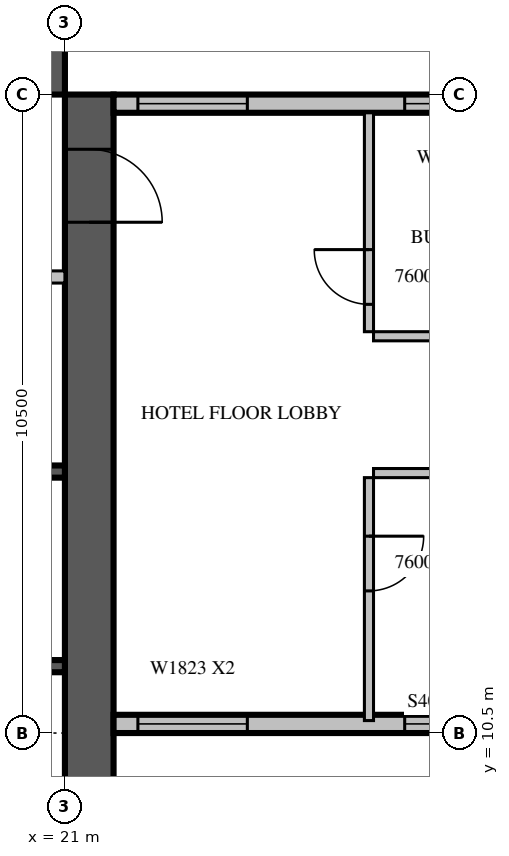
"""IFC4 building model, lengths in metres.
Left out: names, types, materials, properties, quantities, classifications, styles, units other than length and angle.
Written with IfcOpenShell. Run it as: python <this file> out.ifc"""

import sys

from ifc_helpers import new_model, si_unit, direction, frame, frame_2d, origin, place, context, subcontext, project, spatial, rectangle, extrude, source, transform, mapped, element, fill, save


model = new_model("IFC4")
c1 = context("Model", 3, precision=1e-05, world=origin(), true_north=direction((0.0, 1.0)))
c2 = subcontext(c1, "Body", "Model", "MODEL_VIEW")
j1 = project(units=[si_unit("LENGTHUNIT", "METRE"), si_unit("PLANEANGLEUNIT", "RADIAN")], contexts=[c1])
p1 = place(None, origin())
s1 = spatial("IfcSite", under=j1, at=p1, CompositionType="ELEMENT")
p2 = place(p1, origin())
s2 = spatial("IfcBuilding", under=s1, at=p2, CompositionType="ELEMENT")
p3 = place(p2, frame((0.0, 0.0, 261.4)))
s3 = spatial("IfcBuildingStorey", under=s2, at=p3, CompositionType="ELEMENT", Elevation=261.4)
m1 = source(origin(), c2, "Body", "SweptSolid", [
    extrude(rectangle(XDim=16.8, YDim=0.8, at=frame_2d((8.4, 0.0))), origin(), (0.0, 0.0, 1.0), 3.8),
])
p4 = place(p3, frame((21.4, 4.2, 0.0), z_axis=(0.0, 0.0, 1.0), x_axis=(0.0, 1.0, 0.0)))
e1 = element("IfcWall", 1, at=p4, inside=s3, PredefinedType="SHEAR", context=c2, shape_type="MappedRepresentation", body=[
    mapped(m1, transform((0.0, 0.0, 0.0), scale=1.0)),
])
m2 = source(origin(), c2, "Body", "SweptSolid", [
    extrude(rectangle(XDim=1.2, YDim=2.1, at=frame_2d((0.6, 1.05))), frame((0.0, 0.41, 0.0), z_axis=(0.0, -1.0, 0.0), x_axis=(1.0, 0.0, 0.0)), (0.0, 0.0, 1.0), 0.82),
])
p5 = place(p4, frame((14.7, 0.0, 0.0)))
e2 = element("IfcOpeningElement", 2, at=p5, cuts=e1, PredefinedType="OPENING", context=c2, shape_type="MappedRepresentation", body=[
    mapped(m2, transform((0.0, 0.0, 0.0), scale=1.0)),
])
p6 = place(p3, frame((4.2, 21.4, 0.0), z_axis=(0.0, 0.0, 1.0), x_axis=(1.0, 0.0, 0.0)))
e3 = element("IfcWall", 3, at=p6, inside=s3, PredefinedType="SHEAR", context=c2, shape_type="MappedRepresentation", body=[
    mapped(m1, transform((0.0, 0.0, 0.0), scale=1.0)),
])
p7 = place(p6, frame((6.2, 0.0, 0.0)))
e4 = element("IfcOpeningElement", 4, at=p7, cuts=e3, PredefinedType="OPENING", context=c2, shape_type="MappedRepresentation", body=[
    mapped(m2, transform((0.0, 0.0, 0.0), scale=1.0)),
])
m3 = source(origin(), c2, "Body", "SweptSolid", [
    extrude(rectangle(XDim=7.2, YDim=0.3, at=frame_2d((3.6, 0.0))), origin(), (0.0, 0.0, 1.0), 3.4),
])
p8 = place(p3, frame((21.8, 10.65, 0.0), z_axis=(0.0, 0.0, 1.0), x_axis=(1.0, 0.0, 0.0)))
e5 = element("IfcWall", 5, at=p8, inside=s3, PredefinedType="STANDARD", context=c2, shape_type="MappedRepresentation", body=[
    mapped(m3, transform((0.0, 0.0, 0.0), scale=1.0)),
])
m4 = source(origin(), c2, "Body", "SweptSolid", [
    extrude(rectangle(XDim=1.8, YDim=2.3, at=frame_2d((0.9, 1.15))), frame((0.0, 0.16, 0.0), z_axis=(0.0, -1.0, 0.0), x_axis=(1.0, 0.0, 0.0)), (0.0, 0.0, 1.0), 0.32),
])
p9 = place(p8, frame((0.4, 0.0, 0.6)))
e6 = element("IfcOpeningElement", 6, at=p9, cuts=e5, PredefinedType="OPENING", context=c2, shape_type="MappedRepresentation", body=[
    mapped(m4, transform((0.0, 0.0, 0.0), scale=1.0)),
])
p10 = place(p8, frame((4.787, 0.0, 0.6)))
e7 = element("IfcOpeningElement", 7, at=p10, cuts=e5, PredefinedType="OPENING", context=c2, shape_type="MappedRepresentation", body=[
    mapped(m4, transform((0.0, 0.0, 0.0), scale=1.0)),
])
p11 = place(p3, frame((29.0, 20.85, 0.0), z_axis=(0.0, 0.0, 1.0), x_axis=(-1.0, 0.0, 0.0)))
e8 = element("IfcWall", 8, at=p11, inside=s3, PredefinedType="STANDARD", context=c2, shape_type="MappedRepresentation", body=[
    mapped(m3, transform((0.0, 0.0, 0.0), scale=1.0)),
])
p12 = place(p11, frame((0.613, 0.0, 0.6)))
e9 = element("IfcOpeningElement", 9, at=p12, cuts=e8, PredefinedType="OPENING", context=c2, shape_type="MappedRepresentation", body=[
    mapped(m4, transform((0.0, 0.0, 0.0), scale=1.0)),
])
p13 = place(p11, frame((5.0, 0.0, 0.6)))
e10 = element("IfcOpeningElement", 10, at=p13, cuts=e8, PredefinedType="OPENING", context=c2, shape_type="MappedRepresentation", body=[
    mapped(m4, transform((0.0, 0.0, 0.0), scale=1.0)),
])
m5 = source(origin(), c2, "Body", "SweptSolid", [
    extrude(rectangle(XDim=9.6, YDim=0.2, at=frame_2d((4.8, 0.0))), origin(), (0.0, 0.0, 1.0), 3.8),
])
p14 = place(p3, frame((11.4, 11.6, 0.0), z_axis=(0.0, 0.0, 1.0), x_axis=(1.0, 0.0, 0.0)))
e11 = element("IfcWall", 11, at=p14, inside=s3, PredefinedType="SOLIDWALL", context=c2, shape_type="MappedRepresentation", body=[
    mapped(m5, transform((0.0, 0.0, 0.0), scale=1.0)),
])
p15 = place(p3, frame((11.4, 14.8, 0.0), z_axis=(0.0, 0.0, 1.0), x_axis=(1.0, 0.0, 0.0)))
e12 = element("IfcWall", 12, at=p15, inside=s3, PredefinedType="SOLIDWALL", context=c2, shape_type="MappedRepresentation", body=[
    mapped(m5, transform((0.0, 0.0, 0.0), scale=1.0)),
])
m6 = source(origin(), c2, "Body", "SweptSolid", [
    extrude(rectangle(XDim=1.1, YDim=2.1, at=frame_2d((0.55, 1.05))), frame((0.0, 0.11, 0.0), z_axis=(0.0, -1.0, 0.0), x_axis=(1.0, 0.0, 0.0)), (0.0, 0.0, 1.0), 0.22),
])
p16 = place(p15, frame((3.05, 0.0, 0.0)))
e13 = element("IfcOpeningElement", 13, at=p16, cuts=e12, PredefinedType="OPENING", context=c2, shape_type="MappedRepresentation", body=[
    mapped(m6, transform((0.0, 0.0, 0.0), scale=1.0)),
])
p17 = place(p15, frame((5.45, 0.0, 0.0)))
e14 = element("IfcOpeningElement", 14, at=p17, cuts=e12, PredefinedType="OPENING", context=c2, shape_type="MappedRepresentation", body=[
    mapped(m6, transform((0.0, 0.0, 0.0), scale=1.0)),
])
p18 = place(p15, frame((7.85, 0.0, 0.0)))
e15 = element("IfcOpeningElement", 15, at=p18, cuts=e12, PredefinedType="OPENING", context=c2, shape_type="MappedRepresentation", body=[
    mapped(m6, transform((0.0, 0.0, 0.0), scale=1.0)),
])
m7 = source(origin(), c2, "Body", "SweptSolid", [
    extrude(rectangle(XDim=11.45, YDim=0.2, at=frame_2d((5.725, 0.0))), origin(), (0.0, 0.0, 1.0), 3.4),
])
p19 = place(p3, frame((9.55, 18.0, 0.0), z_axis=(0.0, 0.0, 1.0), x_axis=(1.0, 0.0, 0.0)))
e16 = element("IfcWall", 16, at=p19, inside=s3, PredefinedType="PARTITIONING", context=c2, shape_type="MappedRepresentation", body=[
    mapped(m7, transform((0.0, 0.0, 0.0), scale=1.0)),
])
m8 = source(origin(), c2, "Body", "SweptSolid", [
    extrude(rectangle(XDim=0.9, YDim=2.1, at=frame_2d((0.45, 1.05))), frame((0.0, 0.11, 0.0), z_axis=(0.0, -1.0, 0.0), x_axis=(1.0, 0.0, 0.0)), (0.0, 0.0, 1.0), 0.22),
])
p20 = place(p19, frame((0.375, 0.0, 0.0)))
e17 = element("IfcOpeningElement", 17, at=p20, cuts=e16, PredefinedType="OPENING", context=c2, shape_type="MappedRepresentation", body=[
    mapped(m8, transform((0.0, 0.0, 0.0), scale=1.0)),
])
p21 = place(p19, frame((1.7, 0.0, 0.0)))
e18 = element("IfcOpeningElement", 18, at=p21, cuts=e16, PredefinedType="OPENING", context=c2, shape_type="MappedRepresentation", body=[
    mapped(m8, transform((0.0, 0.0, 0.0), scale=1.0)),
])
p22 = place(p19, frame((3.075, 0.0, 0.0)))
e19 = element("IfcOpeningElement", 19, at=p22, cuts=e16, PredefinedType="OPENING", context=c2, shape_type="MappedRepresentation", body=[
    mapped(m8, transform((0.0, 0.0, 0.0), scale=1.0)),
])
p23 = place(p19, frame((7.35, 0.0, 0.0)))
e20 = element("IfcOpeningElement", 20, at=p23, cuts=e16, PredefinedType="OPENING", context=c2, shape_type="MappedRepresentation", body=[
    mapped(m6, transform((0.0, 0.0, 0.0), scale=1.0)),
])
m9 = source(origin(), c2, "Body", "SweptSolid", [
    extrude(rectangle(XDim=3.995, YDim=0.15, at=frame_2d((1.998, 0.0))), origin(), (0.0, 0.0, 1.0), 3.4),
])
p24 = place(p3, frame((26.0, 14.7, 0.0), z_axis=(0.0, 0.0, 1.0), x_axis=(0.0, -1.0, 0.0)))
e21 = element("IfcWall", 21, at=p24, inside=s3, PredefinedType="PARTITIONING", context=c2, shape_type="MappedRepresentation", body=[
    mapped(m9, transform((0.0, 0.0, 0.0), scale=1.0)),
])
m10 = source(origin(), c2, "Body", "SweptSolid", [
    extrude(rectangle(XDim=0.9, YDim=2.1, at=frame_2d((0.45, 1.05))), frame((0.0, 0.085, 0.0), z_axis=(0.0, -1.0, 0.0), x_axis=(1.0, 0.0, 0.0)), (0.0, 0.0, 1.0), 0.17),
])
p25 = place(p24, frame((0.963, 0.0, 0.0)))
e22 = element("IfcOpeningElement", 22, at=p25, cuts=e21, PredefinedType="OPENING", context=c2, shape_type="MappedRepresentation", body=[
    mapped(m10, transform((0.0, 0.0, 0.0), scale=1.0)),
])
m11 = source(origin(), c2, "Body", "SweptSolid", [
    extrude(rectangle(XDim=3.6, YDim=0.15, at=frame_2d((1.8, 0.0))), origin(), (0.0, 0.0, 1.0), 3.4),
])
p26 = place(p3, frame((26.0, 20.7, 0.0), z_axis=(0.0, 0.0, 1.0), x_axis=(0.0, -1.0, 0.0)))
e23 = element("IfcWall", 23, at=p26, inside=s3, PredefinedType="PARTITIONING", context=c2, shape_type="MappedRepresentation", body=[
    mapped(m11, transform((0.0, 0.0, 0.0), scale=1.0)),
])
p27 = place(p26, frame((2.25, 0.0, 0.0)))
e24 = element("IfcOpeningElement", 24, at=p27, cuts=e23, PredefinedType="OPENING", context=c2, shape_type="MappedRepresentation", body=[
    mapped(m10, transform((0.0, 0.0, 0.0), scale=1.0)),
])
m12 = source(origin(), c2, "Body", "SweptSolid", [
    extrude(rectangle(XDim=3.25, YDim=0.15, at=frame_2d((1.625, 0.0))), origin(), (0.0, 0.0, 1.0), 3.4),
])
for number, where, z_axis, x_axis in (
    (25, (29.325, 14.775, 0.0), (0.0, 0.0, 1.0), (-1.0, 0.0, 0.0)),
    (26, (26.075, 17.025, 0.0), (0.0, 0.0, 1.0), (1.0, 0.0, 0.0)),
):
    element("IfcWall", number, at=place(p3, frame(where, z_axis=z_axis, x_axis=x_axis)), inside=s3, PredefinedType="PARTITIONING", context=c2, shape_type="MappedRepresentation", body=[
        mapped(m12, transform((0.0, 0.0, 0.0), scale=1.0)),
    ])
m13 = source(origin(), c2, "Body", "SweptSolid", [
    extrude(rectangle(XDim=1.8, YDim=2.3, at=frame_2d((0.9, 1.15))), frame((0.0, 0.03, 0.0), z_axis=(0.0, -1.0, 0.0), x_axis=(1.0, 0.0, 0.0)), (0.0, 0.0, 1.0), 0.06),
])
p28 = place(p9, origin())
e27 = element("IfcWindow", 27, at=p28, inside=s3, PartitioningType="SINGLE_PANEL", PredefinedType="WINDOW", context=c2, shape_type="MappedRepresentation", body=[
    mapped(m13, transform((0.0, 0.0, 0.0), scale=1.0)),
])
fill(e6, e27)
p29 = place(p10, origin())
e28 = element("IfcWindow", 28, at=p29, inside=s3, PartitioningType="SINGLE_PANEL", PredefinedType="WINDOW", context=c2, shape_type="MappedRepresentation", body=[
    mapped(m13, transform((0.0, 0.0, 0.0), scale=1.0)),
])
fill(e7, e28)
p30 = place(p12, origin())
e29 = element("IfcWindow", 29, at=p30, inside=s3, PartitioningType="SINGLE_PANEL", PredefinedType="WINDOW", context=c2, shape_type="MappedRepresentation", body=[
    mapped(m13, transform((0.0, 0.0, 0.0), scale=1.0)),
])
fill(e9, e29)
p31 = place(p13, origin())
e30 = element("IfcWindow", 30, at=p31, inside=s3, PartitioningType="SINGLE_PANEL", PredefinedType="WINDOW", context=c2, shape_type="MappedRepresentation", body=[
    mapped(m13, transform((0.0, 0.0, 0.0), scale=1.0)),
])
fill(e10, e30)
m14 = source(origin(), c2, "Body", "SweptSolid", [
    extrude(rectangle(XDim=1.2, YDim=2.1, at=frame_2d((0.6, 1.05))), frame((0.0, 0.025, 0.0), z_axis=(0.0, -1.0, 0.0), x_axis=(1.0, 0.0, 0.0)), (0.0, 0.0, 1.0), 0.05),
])
p32 = place(p5, origin())
e31 = element("IfcDoor", 31, at=p32, inside=s3, OperationType="SINGLE_SWING_RIGHT", PredefinedType="DOOR", context=c2, shape_type="MappedRepresentation", body=[
    mapped(m14, transform((0.0, 0.0, 0.0), scale=1.0)),
])
fill(e2, e31)
m15 = source(origin(), c2, "Body", "SweptSolid", [
    extrude(rectangle(XDim=0.9, YDim=2.1, at=frame_2d((0.45, 1.05))), frame((0.0, 0.025, 0.0), z_axis=(0.0, -1.0, 0.0), x_axis=(1.0, 0.0, 0.0)), (0.0, 0.0, 1.0), 0.05),
])
p33 = place(p25, origin())
e32 = element("IfcDoor", 32, at=p33, inside=s3, OperationType="SINGLE_SWING_LEFT", PredefinedType="DOOR", context=c2, shape_type="MappedRepresentation", body=[
    mapped(m15, transform((0.0, 0.0, 0.0), scale=1.0)),
])
fill(e22, e32)
p34 = place(p27, origin())
e33 = element("IfcDoor", 33, at=p34, inside=s3, OperationType="SINGLE_SWING_RIGHT", PredefinedType="DOOR", context=c2, shape_type="MappedRepresentation", body=[
    mapped(m15, transform((0.0, 0.0, 0.0), scale=1.0)),
])
fill(e24, e33)
save(model, sys.argv[1])
